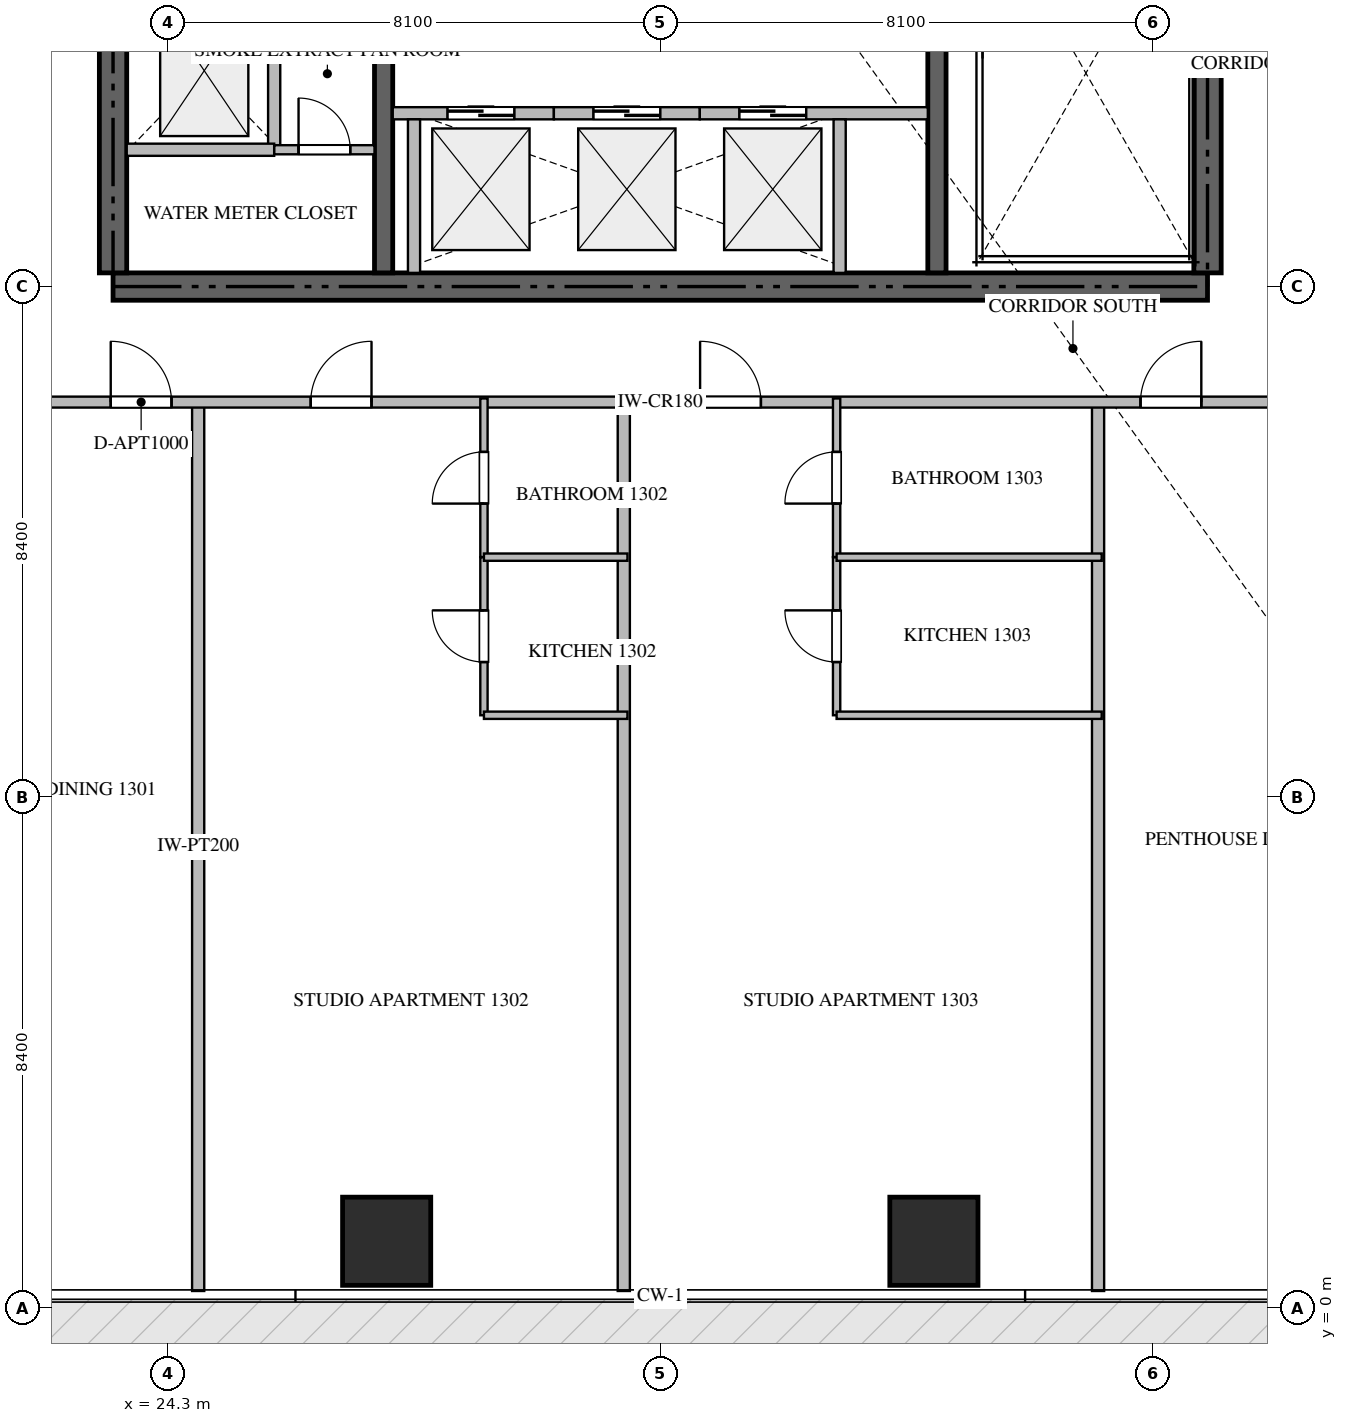
"""IFC4 building model, lengths in metres.
Left out: names, types, materials, properties, quantities, classifications, styles, units other than length and angle.
Written with IfcOpenShell. Run it as: python <this file> out.ifc"""

import sys

from ifc_helpers import new_model, si_unit, direction, frame, frame_2d, origin, origin_2d, place, context, subcontext, project, spatial, rectangle, extrude, source, transform, mapped, element, fill, save


model = new_model("IFC4")
c1 = context("Model", 3, precision=1e-05, world=origin(), true_north=direction((0.0, 1.0)))
c2 = subcontext(c1, "Body", "Model", "MODEL_VIEW")
j1 = project(units=[si_unit("LENGTHUNIT", "METRE"), si_unit("PLANEANGLEUNIT", "RADIAN")], contexts=[c1])
p1 = place(None, origin())
s1 = spatial("IfcSite", under=j1, at=p1, CompositionType="ELEMENT")
p2 = place(p1, origin())
s2 = spatial("IfcBuilding", under=s1, at=p2, CompositionType="ELEMENT")
p3 = place(p2, frame((0.0, 0.0, 56.7)))
s3 = spatial("IfcBuildingStorey", under=s2, at=p3, CompositionType="ELEMENT", Elevation=56.7)
p4 = place(p3, frame((23.4, 16.8, -0.26), z_axis=(0.0, 0.0, 1.0), x_axis=(1.0, 0.0, 0.0)))
e1 = element("IfcWall", 1, at=p4, inside=s3, PredefinedType="SHEAR", context=c2, shape_type="SweptSolid", body=[
    extrude(rectangle(XDim=18.0, YDim=0.45, at=frame_2d((9.0, 0.0))), origin(), (0.0, 0.0, 1.0), 3.748),
])
p5 = place(p3, frame((23.4, 17.025, -0.26), z_axis=(0.0, 0.0, 1.0), x_axis=(0.0, 1.0, 0.0)))
e2 = element("IfcWall", 2, at=p5, inside=s3, PredefinedType="SHEAR", context=c2, shape_type="SweptSolid", body=[
    extrude(rectangle(XDim=4.825, YDim=0.45, at=frame_2d((2.413, 0.0))), origin(), (0.0, 0.0, 1.0), 3.748),
])
p6 = place(p3, frame((41.4, 17.025, -0.26), z_axis=(0.0, 0.0, 1.0), x_axis=(0.0, 1.0, 0.0)))
e3 = element("IfcWall", 3, at=p6, inside=s3, PredefinedType="SHEAR", context=c2, shape_type="SweptSolid", body=[
    extrude(rectangle(XDim=8.325, YDim=0.45, at=frame_2d((4.163, 0.0))), origin(), (0.0, 0.0, 1.0), 3.748),
])
p7 = place(p3, frame((27.85, 17.025, -0.26), z_axis=(0.0, 0.0, 1.0), x_axis=(0.0, 1.0, 0.0)))
e4 = element("IfcWall", 4, at=p7, inside=s3, PredefinedType="SHEAR", context=c2, shape_type="SweptSolid", body=[
    extrude(rectangle(XDim=4.825, YDim=0.3, at=frame_2d((2.413, 0.0))), origin(), (0.0, 0.0, 1.0), 3.748),
])
p8 = place(p3, frame((36.95, 17.025, -0.26), z_axis=(0.0, 0.0, 1.0), x_axis=(0.0, 1.0, 0.0)))
e5 = element("IfcWall", 5, at=p8, inside=s3, PredefinedType="SHEAR", context=c2, shape_type="SweptSolid", body=[
    extrude(rectangle(XDim=8.325, YDim=0.3, at=frame_2d((4.163, 0.0))), origin(), (0.0, 0.0, 1.0), 3.748),
])
m1 = source(origin(), c2, "Body", "SweptSolid", [
    extrude(rectangle(XDim=1.45, YDim=1.45, at=origin_2d()), origin(), (0.0, 0.0, 1.0), 3.75),
])
for number, where, z_axis, x_axis in (
    (6, (27.9, 1.1, -0.26), (0.0, 0.0, 1.0), (1.0, 0.0, 0.0)),
    (7, (36.9, 1.1, -0.26), (0.0, 0.0, 1.0), (1.0, 0.0, 0.0)),
):
    element("IfcColumn", number, at=place(p3, frame(where, z_axis=z_axis, x_axis=x_axis)), inside=s3, PredefinedType="COLUMN", context=c2, shape_type="MappedRepresentation", body=[
        mapped(m1, transform((0.0, 0.0, 0.0), scale=1.0)),
    ])
p9 = place(p3, frame((28.0, 19.65, 0.0), z_axis=(0.0, 0.0, 1.0), x_axis=(1.0, 0.0, 0.0)))
e8 = element("IfcWall", 8, at=p9, inside=s3, PredefinedType="STANDARD", context=c2, shape_type="SweptSolid", body=[
    extrude(rectangle(XDim=2.65, YDim=0.2, at=frame_2d((1.325, 0.0))), origin(), (0.0, 0.0, 1.0), 3.49),
])
p10 = place(p9, frame((0.9, 0.0, 0.0)))
e9 = element("IfcOpeningElement", 9, at=p10, cuts=e8, PredefinedType="OPENING", context=c2, shape_type="SweptSolid", body=[
    extrude(rectangle(XDim=1.1, YDim=2.2, at=frame_2d((0.55, 1.1))), frame((0.0, 0.11, 0.0), z_axis=(0.0, -1.0, 0.0), x_axis=(1.0, 0.0, 0.0)), (0.0, 0.0, 1.0), 0.22),
])
p11 = place(p3, frame((28.35, 17.025, 0.0), z_axis=(0.0, 0.0, 1.0), x_axis=(0.0, 1.0, 0.0)))
e10 = element("IfcWall", 10, at=p11, inside=s3, PredefinedType="STANDARD", context=c2, shape_type="SweptSolid", body=[
    extrude(rectangle(XDim=2.525, YDim=0.2, at=frame_2d((1.263, 0.0))), origin(), (0.0, 0.0, 1.0), 3.49),
])
p12 = place(p3, frame((30.65, 19.65, 0.0), z_axis=(0.0, 0.0, 1.0), x_axis=(1.0, 0.0, 0.0)))
e11 = element("IfcWall", 11, at=p12, inside=s3, PredefinedType="STANDARD", context=c2, shape_type="SweptSolid", body=[
    extrude(rectangle(XDim=2.4, YDim=0.2, at=frame_2d((1.2, 0.0))), origin(), (0.0, 0.0, 1.0), 3.49),
])
p13 = place(p12, frame((0.65, 0.0, 0.0)))
e12 = element("IfcOpeningElement", 12, at=p13, cuts=e11, PredefinedType="OPENING", context=c2, shape_type="SweptSolid", body=[
    extrude(rectangle(XDim=1.1, YDim=2.2, at=frame_2d((0.55, 1.1))), frame((0.0, 0.11, 0.0), z_axis=(0.0, -1.0, 0.0), x_axis=(1.0, 0.0, 0.0)), (0.0, 0.0, 1.0), 0.22),
])
p14 = place(p3, frame((33.05, 19.65, 0.0), z_axis=(0.0, 0.0, 1.0), x_axis=(1.0, 0.0, 0.0)))
e13 = element("IfcWall", 13, at=p14, inside=s3, PredefinedType="STANDARD", context=c2, shape_type="SweptSolid", body=[
    extrude(rectangle(XDim=3.75, YDim=0.2, at=frame_2d((1.875, 0.0))), origin(), (0.0, 0.0, 1.0), 3.49),
])
p15 = place(p14, frame((0.65, 0.0, 0.0)))
e14 = element("IfcOpeningElement", 14, at=p15, cuts=e13, PredefinedType="OPENING", context=c2, shape_type="SweptSolid", body=[
    extrude(rectangle(XDim=1.1, YDim=2.2, at=frame_2d((0.55, 1.1))), frame((0.0, 0.11, 0.0), z_axis=(0.0, -1.0, 0.0), x_axis=(1.0, 0.0, 0.0)), (0.0, 0.0, 1.0), 0.22),
])
p16 = place(p3, frame((35.35, 17.025, 0.0), z_axis=(0.0, 0.0, 1.0), x_axis=(0.0, 1.0, 0.0)))
e15 = element("IfcWall", 15, at=p16, inside=s3, PredefinedType="STANDARD", context=c2, shape_type="SweptSolid", body=[
    extrude(rectangle(XDim=2.525, YDim=0.2, at=frame_2d((1.263, 0.0))), origin(), (0.0, 0.0, 1.0), 3.49),
])
p17 = place(p3, frame((26.05, 19.05, 0.0), z_axis=(0.0, 0.0, 1.0), x_axis=(0.0, 1.0, 0.0)))
e16 = element("IfcWall", 16, at=p17, inside=s3, PredefinedType="STANDARD", context=c2, shape_type="SweptSolid", body=[
    extrude(rectangle(XDim=2.5, YDim=0.2, at=frame_2d((1.25, 0.0))), origin(), (0.0, 0.0, 1.0), 3.49),
])
p18 = place(p3, frame((23.625, 19.05, 0.0), z_axis=(0.0, 0.0, 1.0), x_axis=(1.0, 0.0, 0.0)))
e17 = element("IfcWall", 17, at=p18, inside=s3, PredefinedType="STANDARD", context=c2, shape_type="SweptSolid", body=[
    extrude(rectangle(XDim=2.425, YDim=0.2, at=frame_2d((1.212, 0.0))), origin(), (0.0, 0.0, 1.0), 3.49),
])
p19 = place(p3, frame((26.052, 19.05, 0.0), z_axis=(0.0, 0.0, 1.0), x_axis=(1.0, 0.0, 0.0)))
e18 = element("IfcWall", 18, at=p19, inside=s3, PredefinedType="PARTITIONING", context=c2, shape_type="SweptSolid", body=[
    extrude(rectangle(XDim=1.648, YDim=0.15, at=frame_2d((0.824, 0.0))), origin(), (0.0, 0.0, 1.0), 3.49),
])
p20 = place(p19, frame((0.399, 0.0, 0.0)))
e19 = element("IfcOpeningElement", 19, at=p20, cuts=e18, PredefinedType="OPENING", context=c2, shape_type="SweptSolid", body=[
    extrude(rectangle(XDim=0.85, YDim=2.1, at=frame_2d((0.425, 1.05))), frame((0.0, 0.085, 0.0), z_axis=(0.0, -1.0, 0.0), x_axis=(1.0, 0.0, 0.0)), (0.0, 0.0, 1.0), 0.17),
])
for number, where, z_axis, x_axis in (
    (20, (24.8, 0.282, 0.0), (0.0, 0.0, 1.0), (0.0, 1.0, 0.0)),
    (21, (31.8, 0.282, 0.0), (0.0, 0.0, 1.0), (0.0, 1.0, 0.0)),
    (22, (39.6, 0.282, 0.0), (0.0, 0.0, 1.0), (0.0, 1.0, 0.0)),
):
    element("IfcWall", number, at=place(p3, frame(where, z_axis=z_axis, x_axis=x_axis)), inside=s3, PredefinedType="PARTITIONING", context=c2, shape_type="SweptSolid", body=[
        extrude(rectangle(XDim=14.618, YDim=0.2, at=frame_2d((7.309, 0.0))), origin(), (0.0, 0.0, 1.0), 3.49),
    ])
p21 = place(p3, frame((21.402, 14.9, 0.0), z_axis=(0.0, 0.0, 1.0), x_axis=(1.0, 0.0, 0.0)))
e23 = element("IfcWall", 23, at=p21, inside=s3, PredefinedType="PARTITIONING", context=c2, shape_type="SweptSolid", body=[
    extrude(rectangle(XDim=21.996, YDim=0.18, at=frame_2d((10.998, 0.0))), origin(), (0.0, 0.0, 1.0), 3.49),
])
p22 = place(p21, frame((1.96, 0.0, 0.0)))
e24 = element("IfcOpeningElement", 24, at=p22, cuts=e23, PredefinedType="OPENING", context=c2, shape_type="SweptSolid", body=[
    extrude(rectangle(XDim=1.0, YDim=2.15, at=frame_2d((0.5, 1.075))), frame((0.0, 0.1, 0.0), z_axis=(0.0, -1.0, 0.0), x_axis=(1.0, 0.0, 0.0)), (0.0, 0.0, 1.0), 0.2),
])
p23 = place(p21, frame((5.249, 0.0, 0.0)))
e25 = element("IfcOpeningElement", 25, at=p23, cuts=e23, PredefinedType="OPENING", context=c2, shape_type="SweptSolid", body=[
    extrude(rectangle(XDim=1.0, YDim=2.15, at=frame_2d((0.5, 1.075))), frame((0.0, 0.1, 0.0), z_axis=(0.0, -1.0, 0.0), x_axis=(1.0, 0.0, 0.0)), (0.0, 0.0, 1.0), 0.2),
])
p24 = place(p21, frame((11.653, 0.0, 0.0)))
e26 = element("IfcOpeningElement", 26, at=p24, cuts=e23, PredefinedType="OPENING", context=c2, shape_type="SweptSolid", body=[
    extrude(rectangle(XDim=1.0, YDim=2.15, at=frame_2d((0.5, 1.075))), frame((0.0, 0.1, 0.0), z_axis=(0.0, -1.0, 0.0), x_axis=(1.0, 0.0, 0.0)), (0.0, 0.0, 1.0), 0.2),
])
p25 = place(p21, frame((18.896, 0.0, 0.0)))
e27 = element("IfcOpeningElement", 27, at=p25, cuts=e23, PredefinedType="OPENING", context=c2, shape_type="SweptSolid", body=[
    extrude(rectangle(XDim=1.0, YDim=2.15, at=frame_2d((0.5, 1.075))), frame((0.0, 0.1, 0.0), z_axis=(0.0, -1.0, 0.0), x_axis=(1.0, 0.0, 0.0)), (0.0, 0.0, 1.0), 0.2),
])
p26 = place(p3, frame((29.5, 9.75, 0.0), z_axis=(0.0, 0.0, 1.0), x_axis=(0.0, 1.0, 0.0)))
e28 = element("IfcWall", 28, at=p26, inside=s3, PredefinedType="PARTITIONING", context=c2, shape_type="SweptSolid", body=[
    extrude(rectangle(XDim=2.6, YDim=0.12, at=frame_2d((1.3, 0.0))), origin(), (0.0, 0.0, 1.0), 3.49),
])
p27 = place(p26, frame((0.875, 0.0, 0.0)))
e29 = element("IfcOpeningElement", 29, at=p27, cuts=e28, PredefinedType="OPENING", context=c2, shape_type="SweptSolid", body=[
    extrude(rectangle(XDim=0.85, YDim=2.1, at=frame_2d((0.425, 1.05))), frame((0.0, 0.07, 0.0), z_axis=(0.0, -1.0, 0.0), x_axis=(1.0, 0.0, 0.0)), (0.0, 0.0, 1.0), 0.14),
])
p28 = place(p3, frame((29.5, 12.352, 0.0), z_axis=(0.0, 0.0, 1.0), x_axis=(0.0, 1.0, 0.0)))
e30 = element("IfcWall", 30, at=p28, inside=s3, PredefinedType="PARTITIONING", context=c2, shape_type="SweptSolid", body=[
    extrude(rectangle(XDim=2.608, YDim=0.12, at=frame_2d((1.304, 0.0))), origin(), (0.0, 0.0, 1.0), 3.49),
])
p29 = place(p28, frame((0.879, 0.0, 0.0)))
e31 = element("IfcOpeningElement", 31, at=p29, cuts=e30, PredefinedType="OPENING", context=c2, shape_type="SweptSolid", body=[
    extrude(rectangle(XDim=0.85, YDim=2.1, at=frame_2d((0.425, 1.05))), frame((0.0, 0.07, 0.0), z_axis=(0.0, -1.0, 0.0), x_axis=(1.0, 0.0, 0.0)), (0.0, 0.0, 1.0), 0.14),
])
for number, where, z_axis, x_axis in (
    (32, (29.5, 12.35, 0.0), (0.0, 0.0, 1.0), (1.0, 0.0, 0.0)),
    (33, (29.5, 9.75, 0.0), (0.0, 0.0, 1.0), (1.0, 0.0, 0.0)),
):
    element("IfcWall", number, at=place(p3, frame(where, z_axis=z_axis, x_axis=x_axis)), inside=s3, PredefinedType="PARTITIONING", context=c2, shape_type="SweptSolid", body=[
        extrude(rectangle(XDim=2.36, YDim=0.12, at=frame_2d((1.18, 0.0))), origin(), (0.0, 0.0, 1.0), 3.49),
    ])
p30 = place(p3, frame((35.3, 9.75, 0.0), z_axis=(0.0, 0.0, 1.0), x_axis=(0.0, 1.0, 0.0)))
e34 = element("IfcWall", 34, at=p30, inside=s3, PredefinedType="PARTITIONING", context=c2, shape_type="SweptSolid", body=[
    extrude(rectangle(XDim=2.6, YDim=0.12, at=frame_2d((1.3, 0.0))), origin(), (0.0, 0.0, 1.0), 3.49),
])
p31 = place(p30, frame((0.875, 0.0, 0.0)))
e35 = element("IfcOpeningElement", 35, at=p31, cuts=e34, PredefinedType="OPENING", context=c2, shape_type="SweptSolid", body=[
    extrude(rectangle(XDim=0.85, YDim=2.1, at=frame_2d((0.425, 1.05))), frame((0.0, 0.07, 0.0), z_axis=(0.0, -1.0, 0.0), x_axis=(1.0, 0.0, 0.0)), (0.0, 0.0, 1.0), 0.14),
])
p32 = place(p3, frame((35.3, 12.352, 0.0), z_axis=(0.0, 0.0, 1.0), x_axis=(0.0, 1.0, 0.0)))
e36 = element("IfcWall", 36, at=p32, inside=s3, PredefinedType="PARTITIONING", context=c2, shape_type="SweptSolid", body=[
    extrude(rectangle(XDim=2.608, YDim=0.12, at=frame_2d((1.304, 0.0))), origin(), (0.0, 0.0, 1.0), 3.49),
])
p33 = place(p32, frame((0.879, 0.0, 0.0)))
e37 = element("IfcOpeningElement", 37, at=p33, cuts=e36, PredefinedType="OPENING", context=c2, shape_type="SweptSolid", body=[
    extrude(rectangle(XDim=0.85, YDim=2.1, at=frame_2d((0.425, 1.05))), frame((0.0, 0.07, 0.0), z_axis=(0.0, -1.0, 0.0), x_axis=(1.0, 0.0, 0.0)), (0.0, 0.0, 1.0), 0.14),
])
for number, where, z_axis, x_axis in (
    (38, (35.3, 12.35, 0.0), (0.0, 0.0, 1.0), (1.0, 0.0, 0.0)),
    (39, (35.3, 9.75, 0.0), (0.0, 0.0, 1.0), (1.0, 0.0, 0.0)),
):
    element("IfcWall", number, at=place(p3, frame(where, z_axis=z_axis, x_axis=x_axis)), inside=s3, PredefinedType="PARTITIONING", context=c2, shape_type="SweptSolid", body=[
        extrude(rectangle(XDim=4.36, YDim=0.12, at=frame_2d((2.18, 0.0))), origin(), (0.0, 0.0, 1.0), 3.49),
    ])
m2 = source(origin(), c2, "Body", "SweptSolid", [
    extrude(rectangle(XDim=1.1, YDim=2.2, at=frame_2d((0.55, 1.1))), frame((0.0, 0.025, 0.0), z_axis=(0.0, -1.0, 0.0), x_axis=(1.0, 0.0, 0.0)), (0.0, 0.0, 1.0), 0.05),
])
p34 = place(p10, origin())
e40 = element("IfcDoor", 40, at=p34, inside=s3, OperationType="DOUBLE_DOOR_SLIDING", PredefinedType="DOOR", context=c2, shape_type="MappedRepresentation", body=[
    mapped(m2, transform((0.0, 0.0, 0.0), scale=1.0)),
])
fill(e9, e40)
p35 = place(p13, origin())
e41 = element("IfcDoor", 41, at=p35, inside=s3, OperationType="DOUBLE_DOOR_SLIDING", PredefinedType="DOOR", context=c2, shape_type="MappedRepresentation", body=[
    mapped(m2, transform((0.0, 0.0, 0.0), scale=1.0)),
])
fill(e12, e41)
p36 = place(p15, origin())
e42 = element("IfcDoor", 42, at=p36, inside=s3, OperationType="DOUBLE_DOOR_SLIDING", PredefinedType="DOOR", context=c2, shape_type="MappedRepresentation", body=[
    mapped(m2, transform((0.0, 0.0, 0.0), scale=1.0)),
])
fill(e14, e42)
m3 = source(origin(), c2, "Body", "SweptSolid", [
    extrude(rectangle(XDim=0.85, YDim=2.1, at=frame_2d((0.425, 1.05))), frame((0.0, 0.025, 0.0), z_axis=(0.0, -1.0, 0.0), x_axis=(1.0, 0.0, 0.0)), (0.0, 0.0, 1.0), 0.05),
])
p37 = place(p20, origin())
e43 = element("IfcDoor", 43, at=p37, inside=s3, OperationType="SINGLE_SWING_LEFT", PredefinedType="DOOR", context=c2, shape_type="MappedRepresentation", body=[
    mapped(m3, transform((0.0, 0.0, 0.0), scale=1.0)),
])
fill(e19, e43)
m4 = source(origin(), c2, "Body", "SweptSolid", [
    extrude(rectangle(XDim=1.0, YDim=2.15, at=frame_2d((0.5, 1.075))), frame((0.0, 0.025, 0.0), z_axis=(0.0, -1.0, 0.0), x_axis=(1.0, 0.0, 0.0)), (0.0, 0.0, 1.0), 0.05),
])
p38 = place(p22, origin())
e44 = element("IfcDoor", 44, at=p38, inside=s3, OperationType="SINGLE_SWING_LEFT", PredefinedType="DOOR", context=c2, shape_type="MappedRepresentation", body=[
    mapped(m4, transform((0.0, 0.0, 0.0), scale=1.0)),
])
fill(e24, e44)
p39 = place(p23, origin())
e45 = element("IfcDoor", 45, at=p39, inside=s3, OperationType="SINGLE_SWING_RIGHT", PredefinedType="DOOR", context=c2, shape_type="MappedRepresentation", body=[
    mapped(m4, transform((0.0, 0.0, 0.0), scale=1.0)),
])
fill(e25, e45)
p40 = place(p24, origin())
e46 = element("IfcDoor", 46, at=p40, inside=s3, OperationType="SINGLE_SWING_LEFT", PredefinedType="DOOR", context=c2, shape_type="MappedRepresentation", body=[
    mapped(m4, transform((0.0, 0.0, 0.0), scale=1.0)),
])
fill(e26, e46)
p41 = place(p25, origin())
e47 = element("IfcDoor", 47, at=p41, inside=s3, OperationType="SINGLE_SWING_RIGHT", PredefinedType="DOOR", context=c2, shape_type="MappedRepresentation", body=[
    mapped(m4, transform((0.0, 0.0, 0.0), scale=1.0)),
])
fill(e27, e47)
p42 = place(p27, origin())
e48 = element("IfcDoor", 48, at=p42, inside=s3, OperationType="SINGLE_SWING_RIGHT", PredefinedType="DOOR", context=c2, shape_type="MappedRepresentation", body=[
    mapped(m3, transform((0.0, 0.0, 0.0), scale=1.0)),
])
fill(e29, e48)
p43 = place(p29, origin())
e49 = element("IfcDoor", 49, at=p43, inside=s3, OperationType="SINGLE_SWING_LEFT", PredefinedType="DOOR", context=c2, shape_type="MappedRepresentation", body=[
    mapped(m3, transform((0.0, 0.0, 0.0), scale=1.0)),
])
fill(e31, e49)
p44 = place(p31, origin())
e50 = element("IfcDoor", 50, at=p44, inside=s3, OperationType="SINGLE_SWING_RIGHT", PredefinedType="DOOR", context=c2, shape_type="MappedRepresentation", body=[
    mapped(m3, transform((0.0, 0.0, 0.0), scale=1.0)),
])
fill(e35, e50)
p45 = place(p33, origin())
e51 = element("IfcDoor", 51, at=p45, inside=s3, OperationType="SINGLE_SWING_LEFT", PredefinedType="DOOR", context=c2, shape_type="MappedRepresentation", body=[
    mapped(m3, transform((0.0, 0.0, 0.0), scale=1.0)),
])
fill(e37, e51)
save(model, sys.argv[1])
